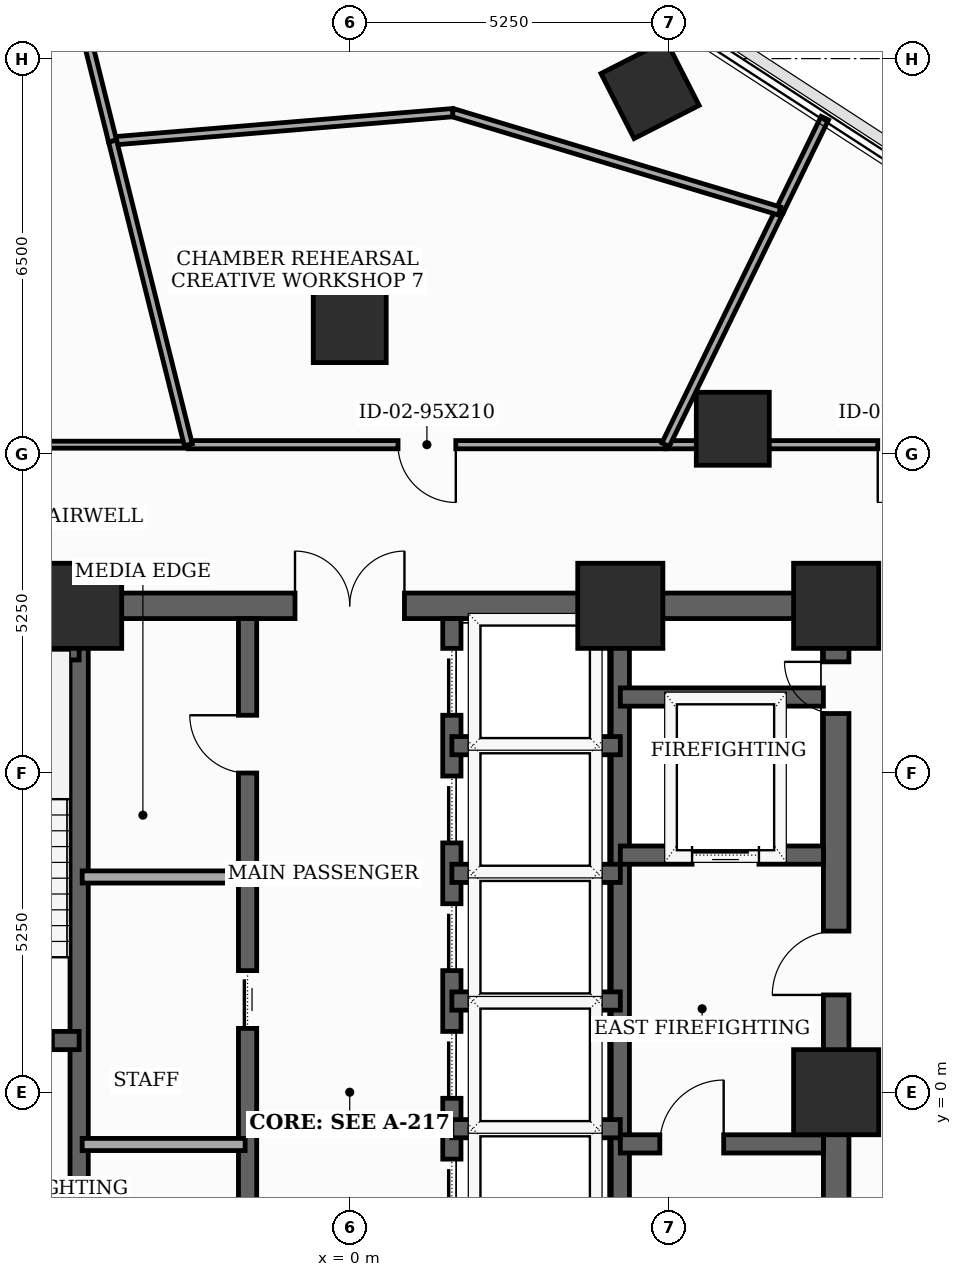
"""IFC4 building model, lengths in metres.
Left out: names, types, materials, properties, quantities, classifications, styles, units other than length and angle.
Written with IfcOpenShell. Run it as: python <this file> out.ifc"""

import sys

from ifc_helpers import new_model, si_unit, direction, frame, frame_2d, origin, origin_2d, place, context, subcontext, project, spatial, rectangle, extrude, element, fill, save


model = new_model("IFC4")
c1 = context("Model", 3, precision=1e-05, world=origin(), true_north=direction((0.0, 1.0)))
c2 = subcontext(c1, "Body", "Model", "MODEL_VIEW")
j1 = project(units=[si_unit("LENGTHUNIT", "METRE"), si_unit("PLANEANGLEUNIT", "RADIAN")], contexts=[c1])
p1 = place(None, origin())
s1 = spatial("IfcSite", under=j1, at=p1, CompositionType="ELEMENT")
p2 = place(p1, origin())
s2 = spatial("IfcBuilding", under=s1, at=p2, CompositionType="ELEMENT")
p3 = place(p2, frame((0.0, 0.0, 131.0)))
s3 = spatial("IfcBuildingStorey", under=s2, at=p3, CompositionType="ELEMENT", Elevation=131.0)
for number, where, z_axis, x_axis in (
    (1, (8.0, 0.0, 0.0), (0.0, 0.0, 1.0), (1.0, 0.0, 0.0)),
    (2, (8.0, 8.0, 0.0), (0.0, 0.0, 1.0), (1.0, 0.0, 0.0)),
    (3, (4.45, 8.0, 0.0), (0.0, 0.0, 1.0), (1.0, 0.0, 0.0)),
    (4, (-4.45, 8.0, 0.0), (0.0, 0.0, 1.0), (1.0, 0.0, 0.0)),
):
    element("IfcColumn", number, at=place(p3, frame(where, z_axis=z_axis, x_axis=x_axis)), inside=s3, PredefinedType="COLUMN", context=c2, shape_type="SweptSolid", body=[
        extrude(rectangle(XDim=1.4, YDim=1.4, at=origin_2d()), origin(), (0.0, 0.0, 1.0), 3.7),
    ])
for number, where, z_axis, x_axis in (
    (5, (6.3, 10.912, 0.0), (0.0, 0.0, 1.0), (1.0, 0.0, 0.0)),
    (6, (0.0, 12.6, 0.0), (0.0, 0.0, 1.0), (1.0, 0.0, 0.0)),
    (7, (4.939, 16.492, 0.0), (0.0, 0.0, 1.0), (0.891, 0.454, 0.0)),
):
    element("IfcColumn", number, at=place(p3, frame(where, z_axis=z_axis, x_axis=x_axis)), inside=s3, PredefinedType="COLUMN", context=c2, shape_type="SweptSolid", body=[
        extrude(rectangle(XDim=1.2, YDim=1.2, at=origin_2d()), origin(), (0.0, 0.0, 1.0), 3.7),
    ])
p4 = place(p3, frame((8.0, -8.0, 0.0), z_axis=(0.0, 0.0, 1.0), x_axis=(0.0, 1.0, 0.0)))
e8 = element("IfcWall", 8, at=p4, inside=s3, PredefinedType="SHEAR", context=c2, shape_type="SweptSolid", body=[
    extrude(rectangle(XDim=16.0, YDim=0.42, at=frame_2d((8.0, 0.0))), origin(), (0.0, 0.0, 1.0), 3.5),
])
p5 = place(p4, frame((9.6, 0.0, 0.0)))
e9 = element("IfcOpeningElement", 9, at=p5, cuts=e8, PredefinedType="OPENING", context=c2, shape_type="SweptSolid", body=[
    extrude(rectangle(XDim=1.05, YDim=2.15, at=frame_2d((0.525, 1.075))), frame((0.0, 0.22, 0.0), z_axis=(0.0, -1.0, 0.0), x_axis=(1.0, 0.0, 0.0)), (0.0, 0.0, 1.0), 0.44),
])
p6 = place(p4, frame((14.229, 0.0, 0.0)))
e10 = element("IfcOpeningElement", 10, at=p6, cuts=e8, PredefinedType="OPENING", context=c2, shape_type="SweptSolid", body=[
    extrude(rectangle(XDim=0.85, YDim=2.02, at=frame_2d((0.425, 1.01))), frame((0.0, 0.22, 0.0), z_axis=(0.0, -1.0, 0.0), x_axis=(1.0, 0.0, 0.0)), (0.0, 0.0, 1.0), 0.44),
])
p7 = place(p3, frame((-8.0, 8.0, 0.0), z_axis=(0.0, 0.0, 1.0), x_axis=(1.0, 0.0, 0.0)))
e11 = element("IfcWall", 11, at=p7, inside=s3, PredefinedType="SHEAR", context=c2, shape_type="SweptSolid", body=[
    extrude(rectangle(XDim=16.0, YDim=0.42, at=frame_2d((8.0, 0.0))), origin(), (0.0, 0.0, 1.0), 3.5),
])
p8 = place(p7, frame((7.1, 0.0, 0.0)))
e12 = element("IfcOpeningElement", 12, at=p8, cuts=e11, PredefinedType="OPENING", context=c2, shape_type="SweptSolid", body=[
    extrude(rectangle(XDim=1.8, YDim=2.15, at=frame_2d((0.9, 1.075))), frame((0.0, 0.22, 0.0), z_axis=(0.0, -1.0, 0.0), x_axis=(1.0, 0.0, 0.0)), (0.0, 0.0, 1.0), 0.44),
])
for number, where, z_axis, x_axis in (
    (13, (-4.45, -7.79, 0.0), (0.0, 0.0, 1.0), (0.0, 1.0, 0.0)),
    (14, (4.45, -7.79, 0.0), (0.0, 0.0, 1.0), (0.0, 1.0, 0.0)),
):
    element("IfcWall", number, at=place(p3, frame(where, z_axis=z_axis, x_axis=x_axis)), inside=s3, PredefinedType="SHEAR", context=c2, shape_type="SweptSolid", body=[
        extrude(rectangle(XDim=15.58, YDim=0.3, at=frame_2d((7.79, 0.0))), origin(), (0.0, 0.0, 1.0), 3.5),
    ])
p9 = place(p3, frame((-7.79, 0.85, 0.0), z_axis=(0.0, 0.0, 1.0), x_axis=(1.0, 0.0, 0.0)))
e15 = element("IfcWall", 15, at=p9, inside=s3, PredefinedType="SHEAR", context=c2, shape_type="SweptSolid", body=[
    extrude(rectangle(XDim=3.34, YDim=0.3, at=frame_2d((1.67, 0.0))), origin(), (0.0, 0.0, 1.0), 3.5),
])
p10 = place(p9, frame((1.85, 0.0, 0.0)))
e16 = element("IfcOpeningElement", 16, at=p10, cuts=e15, PredefinedType="OPENING", context=c2, shape_type="SweptSolid", body=[
    extrude(rectangle(XDim=1.05, YDim=2.15, at=frame_2d((0.525, 1.075))), frame((0.0, 0.16, 0.0), z_axis=(0.0, -1.0, 0.0), x_axis=(1.0, 0.0, 0.0)), (0.0, 0.0, 1.0), 0.32),
])
p11 = place(p3, frame((-7.79, 7.26, 0.0), z_axis=(0.0, 0.0, 1.0), x_axis=(1.0, 0.0, 0.0)))
e17 = element("IfcWall", 17, at=p11, inside=s3, PredefinedType="SHEAR", context=c2, shape_type="SweptSolid", body=[
    extrude(rectangle(XDim=3.34, YDim=0.3, at=frame_2d((1.67, 0.0))), origin(), (0.0, 0.0, 1.0), 3.5),
])
p12 = place(p3, frame((4.45, -0.85, 0.0), z_axis=(0.0, 0.0, 1.0), x_axis=(1.0, 0.0, 0.0)))
e18 = element("IfcWall", 18, at=p12, inside=s3, PredefinedType="SHEAR", context=c2, shape_type="SweptSolid", body=[
    extrude(rectangle(XDim=3.34, YDim=0.3, at=frame_2d((1.67, 0.0))), origin(), (0.0, 0.0, 1.0), 3.5),
])
p13 = place(p12, frame((0.65, 0.0, 0.0)))
e19 = element("IfcOpeningElement", 19, at=p13, cuts=e18, PredefinedType="OPENING", context=c2, shape_type="SweptSolid", body=[
    extrude(rectangle(XDim=1.05, YDim=2.15, at=frame_2d((0.525, 1.075))), frame((0.0, 0.16, 0.0), z_axis=(0.0, -1.0, 0.0), x_axis=(1.0, 0.0, 0.0)), (0.0, 0.0, 1.0), 0.32),
])
p14 = place(p3, frame((4.45, 3.9, 0.0), z_axis=(0.0, 0.0, 1.0), x_axis=(1.0, 0.0, 0.0)))
e20 = element("IfcWall", 20, at=p14, inside=s3, PredefinedType="SHEAR", context=c2, shape_type="SweptSolid", body=[
    extrude(rectangle(XDim=3.34, YDim=0.3, at=frame_2d((1.67, 0.0))), origin(), (0.0, 0.0, 1.0), 3.5),
])
p15 = place(p14, frame((1.18, 0.0, 0.0)))
e21 = element("IfcOpeningElement", 21, at=p15, cuts=e20, PredefinedType="OPENING", context=c2, shape_type="SweptSolid", body=[
    extrude(rectangle(XDim=1.1, YDim=2.1, at=frame_2d((0.55, 1.05))), frame((0.0, 0.16, 0.0), z_axis=(0.0, -1.0, 0.0), x_axis=(1.0, 0.0, 0.0)), (0.0, 0.0, 1.0), 0.32),
])
p16 = place(p3, frame((4.45, 6.5, 0.0), z_axis=(0.0, 0.0, 1.0), x_axis=(1.0, 0.0, 0.0)))
e22 = element("IfcWall", 22, at=p16, inside=s3, PredefinedType="SHEAR", context=c2, shape_type="SweptSolid", body=[
    extrude(rectangle(XDim=3.34, YDim=0.3, at=frame_2d((1.67, 0.0))), origin(), (0.0, 0.0, 1.0), 3.5),
])
p17 = place(p3, frame((-1.68, -4.85, 0.0), z_axis=(0.0, 0.0, 1.0), x_axis=(0.0, 1.0, 0.0)))
e23 = element("IfcWall", 23, at=p17, inside=s3, PredefinedType="SHEAR", context=c2, shape_type="SweptSolid", body=[
    extrude(rectangle(XDim=12.64, YDim=0.3, at=frame_2d((6.32, 0.0))), origin(), (0.0, 0.0, 1.0), 3.5),
])
p18 = place(p17, frame((1.65, 0.0, 0.0)))
e24 = element("IfcOpeningElement", 24, at=p18, cuts=e23, PredefinedType="OPENING", context=c2, shape_type="SweptSolid", body=[
    extrude(rectangle(XDim=0.95, YDim=2.1, at=frame_2d((0.475, 1.05))), frame((0.0, 0.16, 0.0), z_axis=(0.0, -1.0, 0.0), x_axis=(1.0, 0.0, 0.0)), (0.0, 0.0, 1.0), 0.32),
])
p19 = place(p17, frame((5.9, 0.0, 0.0)))
e25 = element("IfcOpeningElement", 25, at=p19, cuts=e23, PredefinedType="OPENING", context=c2, shape_type="SweptSolid", body=[
    extrude(rectangle(XDim=0.95, YDim=2.1, at=frame_2d((0.475, 1.05))), frame((0.0, 0.16, 0.0), z_axis=(0.0, -1.0, 0.0), x_axis=(1.0, 0.0, 0.0)), (0.0, 0.0, 1.0), 0.32),
])
p20 = place(p17, frame((10.1, 0.0, 0.0)))
e26 = element("IfcOpeningElement", 26, at=p20, cuts=e23, PredefinedType="OPENING", context=c2, shape_type="SweptSolid", body=[
    extrude(rectangle(XDim=0.95, YDim=2.1, at=frame_2d((0.475, 1.05))), frame((0.0, 0.16, 0.0), z_axis=(0.0, -1.0, 0.0), x_axis=(1.0, 0.0, 0.0)), (0.0, 0.0, 1.0), 0.32),
])
p21 = place(p3, frame((1.68, -4.85, 0.0), z_axis=(0.0, 0.0, 1.0), x_axis=(0.0, 1.0, 0.0)))
e27 = element("IfcWall", 27, at=p21, inside=s3, PredefinedType="SHEAR", context=c2, shape_type="SweptSolid", body=[
    extrude(rectangle(XDim=12.64, YDim=0.3, at=frame_2d((6.32, 0.0))), origin(), (0.0, 0.0, 1.0), 3.5),
])
p22 = place(p21, frame((0.55, 0.0, 0.0)))
e28 = element("IfcOpeningElement", 28, at=p22, cuts=e27, PredefinedType="OPENING", context=c2, shape_type="SweptSolid", body=[
    extrude(rectangle(XDim=1.1, YDim=2.1, at=frame_2d((0.55, 1.05))), frame((0.0, 0.16, 0.0), z_axis=(0.0, -1.0, 0.0), x_axis=(1.0, 0.0, 0.0)), (0.0, 0.0, 1.0), 0.32),
])
p23 = place(p21, frame((2.65, 0.0, 0.0)))
e29 = element("IfcOpeningElement", 29, at=p23, cuts=e27, PredefinedType="OPENING", context=c2, shape_type="SweptSolid", body=[
    extrude(rectangle(XDim=1.1, YDim=2.1, at=frame_2d((0.55, 1.05))), frame((0.0, 0.16, 0.0), z_axis=(0.0, -1.0, 0.0), x_axis=(1.0, 0.0, 0.0)), (0.0, 0.0, 1.0), 0.32),
])
p24 = place(p21, frame((4.75, 0.0, 0.0)))
e30 = element("IfcOpeningElement", 30, at=p24, cuts=e27, PredefinedType="OPENING", context=c2, shape_type="SweptSolid", body=[
    extrude(rectangle(XDim=1.1, YDim=2.1, at=frame_2d((0.55, 1.05))), frame((0.0, 0.16, 0.0), z_axis=(0.0, -1.0, 0.0), x_axis=(1.0, 0.0, 0.0)), (0.0, 0.0, 1.0), 0.32),
])
p25 = place(p21, frame((6.85, 0.0, 0.0)))
e31 = element("IfcOpeningElement", 31, at=p25, cuts=e27, PredefinedType="OPENING", context=c2, shape_type="SweptSolid", body=[
    extrude(rectangle(XDim=1.1, YDim=2.1, at=frame_2d((0.55, 1.05))), frame((0.0, 0.16, 0.0), z_axis=(0.0, -1.0, 0.0), x_axis=(1.0, 0.0, 0.0)), (0.0, 0.0, 1.0), 0.32),
])
p26 = place(p21, frame((8.95, 0.0, 0.0)))
e32 = element("IfcOpeningElement", 32, at=p26, cuts=e27, PredefinedType="OPENING", context=c2, shape_type="SweptSolid", body=[
    extrude(rectangle(XDim=1.1, YDim=2.1, at=frame_2d((0.55, 1.05))), frame((0.0, 0.16, 0.0), z_axis=(0.0, -1.0, 0.0), x_axis=(1.0, 0.0, 0.0)), (0.0, 0.0, 1.0), 0.32),
])
p27 = place(p21, frame((11.05, 0.0, 0.0)))
e33 = element("IfcOpeningElement", 33, at=p27, cuts=e27, PredefinedType="OPENING", context=c2, shape_type="SweptSolid", body=[
    extrude(rectangle(XDim=1.1, YDim=2.1, at=frame_2d((0.55, 1.05))), frame((0.0, 0.16, 0.0), z_axis=(0.0, -1.0, 0.0), x_axis=(1.0, 0.0, 0.0)), (0.0, 0.0, 1.0), 0.32),
])
for number, where, z_axis, x_axis in (
    (34, (1.68, 1.5, 0.0), (0.0, 0.0, 1.0), (1.0, 0.0, 0.0)),
    (35, (1.68, 3.6, 0.0), (0.0, 0.0, 1.0), (1.0, 0.0, 0.0)),
    (36, (1.68, 5.7, 0.0), (0.0, 0.0, 1.0), (1.0, 0.0, 0.0)),
    (37, (1.68, -0.6, 0.0), (0.0, 0.0, 1.0), (1.0, 0.0, 0.0)),
):
    element("IfcWall", number, at=place(p3, frame(where, z_axis=z_axis, x_axis=x_axis)), inside=s3, PredefinedType="SHEAR", context=c2, shape_type="SweptSolid", body=[
        extrude(rectangle(XDim=2.77, YDim=0.3, at=frame_2d((1.385, 0.0))), origin(), (0.0, 0.0, 1.0), 3.5),
    ])
for number, where, z_axis, x_axis in (
    (38, (-4.4, -0.86, 0.0), (0.0, 0.0, 1.0), (1.0, 0.0, 0.0)),
    (39, (-4.4, 3.54, 0.0), (0.0, 0.0, 1.0), (1.0, 0.0, 0.0)),
):
    element("IfcWall", number, at=place(p3, frame(where, z_axis=z_axis, x_axis=x_axis)), inside=s3, PredefinedType="SOLIDWALL", context=c2, shape_type="SweptSolid", body=[
        extrude(rectangle(XDim=2.68, YDim=0.2, at=frame_2d((1.34, 0.0))), origin(), (0.0, 0.0, 1.0), 3.5),
    ])
p28 = place(p3, frame((10.15, 10.65, 0.0), z_axis=(0.0, 0.0, 1.0), x_axis=(-1.0, 0.0, 0.0)))
e40 = element("IfcWall", 40, at=p28, inside=s3, PredefinedType="PARTITIONING", context=c2, shape_type="SweptSolid", body=[
    extrude(rectangle(XDim=4.956, YDim=0.135, at=frame_2d((2.478, 0.0))), origin(), (0.0, 0.0, 1.0), 2.785),
])
p29 = place(p28, frame((0.516, 0.0, 0.0)))
e41 = element("IfcOpeningElement", 41, at=p29, cuts=e40, PredefinedType="OPENING", context=c2, shape_type="SweptSolid", body=[
    extrude(rectangle(XDim=0.95, YDim=2.1, at=frame_2d((0.475, 1.05))), frame((0.0, 0.077, 0.0), z_axis=(0.0, -1.0, 0.0), x_axis=(1.0, 0.0, 0.0)), (0.0, 0.0, 1.0), 0.155),
])
p30 = place(p3, frame((5.194, 10.65, 0.0), z_axis=(0.0, 0.0, 1.0), x_axis=(-1.0, 0.0, 0.0)))
e42 = element("IfcWall", 42, at=p30, inside=s3, PredefinedType="PARTITIONING", context=c2, shape_type="SweptSolid", body=[
    extrude(rectangle(XDim=7.849, YDim=0.135, at=frame_2d((3.925, 0.0))), origin(), (0.0, 0.0, 1.0), 2.785),
])
p31 = place(p30, frame((3.449, 0.0, 0.0)))
e43 = element("IfcOpeningElement", 43, at=p31, cuts=e42, PredefinedType="OPENING", context=c2, shape_type="SweptSolid", body=[
    extrude(rectangle(XDim=0.95, YDim=2.1, at=frame_2d((0.475, 1.05))), frame((0.0, 0.077, 0.0), z_axis=(0.0, -1.0, 0.0), x_axis=(1.0, 0.0, 0.0)), (0.0, 0.0, 1.0), 0.155),
])
p32 = place(p3, frame((-2.655, 10.65, 0.0), z_axis=(0.0, 0.0, 1.0), x_axis=(-1.0, 0.0, 0.0)))
e44 = element("IfcWall", 44, at=p32, inside=s3, PredefinedType="PARTITIONING", context=c2, shape_type="SweptSolid", body=[
    extrude(rectangle(XDim=7.495, YDim=0.115, at=frame_2d((3.748, 0.0))), origin(), (0.0, 0.0, 1.0), 2.785),
])
p33 = place(p3, frame((7.069, 14.493, 0.0), z_axis=(0.0, 0.0, 1.0), x_axis=(-0.438491124388, -0.898735519401, 0.0)))
e45 = element("IfcWall", 45, at=p33, inside=s3, PredefinedType="PARTITIONING", context=c2, shape_type="SweptSolid", body=[
    extrude(rectangle(XDim=4.276, YDim=0.135, at=frame_2d((2.138, 0.0))), origin(), (0.0, 0.0, 1.0), 2.785),
])
p34 = place(p3, frame((7.813, 16.021, 0.0), z_axis=(0.0, 0.0, 1.0), x_axis=(-0.437939658317, -0.899004369107, 0.0)))
e46 = element("IfcWall", 46, at=p34, inside=s3, PredefinedType="PARTITIONING", context=c2, shape_type="SweptSolid", body=[
    extrude(rectangle(XDim=1.7, YDim=0.135, at=frame_2d((0.85, 0.0))), origin(), (0.0, 0.0, 1.0), 2.985),
])
p35 = place(p3, frame((7.069, 14.493, 0.0), z_axis=(0.0, 0.0, 1.0), x_axis=(-0.957562573124, 0.288225464789, 0.0)))
e47 = element("IfcWall", 47, at=p35, inside=s3, PredefinedType="PARTITIONING", context=c2, shape_type="SweptSolid", body=[
    extrude(rectangle(XDim=5.614, YDim=0.135, at=frame_2d((2.807, 0.0))), origin(), (0.0, 0.0, 1.0), 2.885),
])
p36 = place(p3, frame((1.693, 16.111, 0.0), z_axis=(0.0, 0.0, 1.0), x_axis=(-0.996561637531, -0.082854707786, 0.0)))
e48 = element("IfcWall", 48, at=p36, inside=s3, PredefinedType="PARTITIONING", context=c2, shape_type="SweptSolid", body=[
    extrude(rectangle(XDim=5.613, YDim=0.135, at=frame_2d((2.807, 0.0))), origin(), (0.0, 0.0, 1.0), 2.885),
])
p37 = place(p3, frame((-3.901, 15.646, 0.0), z_axis=(0.0, 0.0, 1.0), x_axis=(0.241955453095, -0.970287358836, 0.0)))
e49 = element("IfcWall", 49, at=p37, inside=s3, PredefinedType="PARTITIONING", context=c2, shape_type="SweptSolid", body=[
    extrude(rectangle(XDim=5.149, YDim=0.135, at=frame_2d((2.575, 0.0))), origin(), (0.0, 0.0, 1.0), 2.785),
])
p38 = place(p3, frame((-6.276, 25.171, 0.0), z_axis=(0.0, 0.0, 1.0), x_axis=(0.241962105276, -0.970285699993, 0.0)))
e50 = element("IfcWall", 50, at=p38, inside=s3, PredefinedType="PARTITIONING", context=c2, shape_type="SweptSolid", body=[
    extrude(rectangle(XDim=9.817, YDim=0.135, at=frame_2d((4.908, 0.0))), origin(), (0.0, 0.0, 1.0), 2.985),
])
p39 = place(p38, frame((4.448, 0.0, 0.0)))
e51 = element("IfcOpeningElement", 51, at=p39, cuts=e50, PredefinedType="OPENING", context=c2, shape_type="SweptSolid", body=[
    extrude(rectangle(XDim=0.92, YDim=2.1, at=frame_2d((0.46, 1.05))), frame((0.0, 0.077, 0.0), z_axis=(0.0, -1.0, 0.0), x_axis=(1.0, 0.0, 0.0)), (0.0, 0.0, 1.0), 0.155),
])
p40 = place(p5, origin())
e52 = element("IfcDoor", 52, at=p40, inside=s3, OperationType="SINGLE_SWING_LEFT", PredefinedType="DOOR", context=c2, shape_type="SweptSolid", body=[
    extrude(rectangle(XDim=1.05, YDim=2.15, at=frame_2d((0.525, 1.075))), frame((0.0, 0.025, 0.0), z_axis=(0.0, -1.0, 0.0), x_axis=(1.0, 0.0, 0.0)), (0.0, 0.0, 1.0), 0.05),
])
fill(e9, e52)
p41 = place(p6, origin())
e53 = element("IfcDoor", 53, at=p41, inside=s3, OperationType="SINGLE_SWING_RIGHT", PredefinedType="TRAPDOOR", context=c2, shape_type="SweptSolid", body=[
    extrude(rectangle(XDim=0.85, YDim=2.02, at=frame_2d((0.425, 1.01))), frame((0.0, 0.025, 0.0), z_axis=(0.0, -1.0, 0.0), x_axis=(1.0, 0.0, 0.0)), (0.0, 0.0, 1.0), 0.05),
])
fill(e10, e53)
p42 = place(p8, origin())
e54 = element("IfcDoor", 54, at=p42, inside=s3, OperationType="DOUBLE_DOOR_SINGLE_SWING", PredefinedType="DOOR", context=c2, shape_type="SweptSolid", body=[
    extrude(rectangle(XDim=1.8, YDim=2.15, at=frame_2d((0.9, 1.075))), frame((0.0, 0.025, 0.0), z_axis=(0.0, -1.0, 0.0), x_axis=(1.0, 0.0, 0.0)), (0.0, 0.0, 1.0), 0.05),
])
fill(e12, e54)
p43 = place(p10, origin())
e55 = element("IfcDoor", 55, at=p43, inside=s3, OperationType="SINGLE_SWING_LEFT", PredefinedType="DOOR", context=c2, shape_type="SweptSolid", body=[
    extrude(rectangle(XDim=1.05, YDim=2.15, at=frame_2d((0.525, 1.075))), frame((0.0, 0.025, 0.0), z_axis=(0.0, -1.0, 0.0), x_axis=(1.0, 0.0, 0.0)), (0.0, 0.0, 1.0), 0.05),
])
fill(e16, e55)
p44 = place(p13, origin())
e56 = element("IfcDoor", 56, at=p44, inside=s3, OperationType="SINGLE_SWING_RIGHT", PredefinedType="DOOR", context=c2, shape_type="SweptSolid", body=[
    extrude(rectangle(XDim=1.05, YDim=2.15, at=frame_2d((0.525, 1.075))), frame((0.0, 0.025, 0.0), z_axis=(0.0, -1.0, 0.0), x_axis=(1.0, 0.0, 0.0)), (0.0, 0.0, 1.0), 0.05),
])
fill(e19, e56)
p45 = place(p15, origin())
e57 = element("IfcDoor", 57, at=p45, inside=s3, OperationType="SLIDING_TO_LEFT", PredefinedType="DOOR", context=c2, shape_type="SweptSolid", body=[
    extrude(rectangle(XDim=1.1, YDim=2.1, at=frame_2d((0.55, 1.05))), frame((0.0, 0.025, 0.0), z_axis=(0.0, -1.0, 0.0), x_axis=(1.0, 0.0, 0.0)), (0.0, 0.0, 1.0), 0.05),
])
fill(e21, e57)
p46 = place(p19, origin())
e58 = element("IfcDoor", 58, at=p46, inside=s3, OperationType="SLIDING_TO_LEFT", PredefinedType="DOOR", context=c2, shape_type="SweptSolid", body=[
    extrude(rectangle(XDim=0.95, YDim=2.1, at=frame_2d((0.475, 1.05))), frame((0.0, 0.025, 0.0), z_axis=(0.0, -1.0, 0.0), x_axis=(1.0, 0.0, 0.0)), (0.0, 0.0, 1.0), 0.05),
])
fill(e25, e58)
p47 = place(p20, origin())
e59 = element("IfcDoor", 59, at=p47, inside=s3, OperationType="SINGLE_SWING_RIGHT", PredefinedType="DOOR", context=c2, shape_type="SweptSolid", body=[
    extrude(rectangle(XDim=0.95, YDim=2.1, at=frame_2d((0.475, 1.05))), frame((0.0, 0.025, 0.0), z_axis=(0.0, -1.0, 0.0), x_axis=(1.0, 0.0, 0.0)), (0.0, 0.0, 1.0), 0.05),
])
fill(e26, e59)
p48 = place(p23, origin())
e60 = element("IfcDoor", 60, at=p48, inside=s3, OperationType="SLIDING_TO_LEFT", PredefinedType="DOOR", context=c2, shape_type="SweptSolid", body=[
    extrude(rectangle(XDim=1.1, YDim=2.1, at=frame_2d((0.55, 1.05))), frame((0.0, 0.025, 0.0), z_axis=(0.0, -1.0, 0.0), x_axis=(1.0, 0.0, 0.0)), (0.0, 0.0, 1.0), 0.05),
])
fill(e29, e60)
p49 = place(p24, origin())
e61 = element("IfcDoor", 61, at=p49, inside=s3, OperationType="SLIDING_TO_LEFT", PredefinedType="DOOR", context=c2, shape_type="SweptSolid", body=[
    extrude(rectangle(XDim=1.1, YDim=2.1, at=frame_2d((0.55, 1.05))), frame((0.0, 0.025, 0.0), z_axis=(0.0, -1.0, 0.0), x_axis=(1.0, 0.0, 0.0)), (0.0, 0.0, 1.0), 0.05),
])
fill(e30, e61)
p50 = place(p25, origin())
e62 = element("IfcDoor", 62, at=p50, inside=s3, OperationType="SLIDING_TO_LEFT", PredefinedType="DOOR", context=c2, shape_type="SweptSolid", body=[
    extrude(rectangle(XDim=1.1, YDim=2.1, at=frame_2d((0.55, 1.05))), frame((0.0, 0.025, 0.0), z_axis=(0.0, -1.0, 0.0), x_axis=(1.0, 0.0, 0.0)), (0.0, 0.0, 1.0), 0.05),
])
fill(e31, e62)
p51 = place(p26, origin())
e63 = element("IfcDoor", 63, at=p51, inside=s3, OperationType="SLIDING_TO_LEFT", PredefinedType="DOOR", context=c2, shape_type="SweptSolid", body=[
    extrude(rectangle(XDim=1.1, YDim=2.1, at=frame_2d((0.55, 1.05))), frame((0.0, 0.025, 0.0), z_axis=(0.0, -1.0, 0.0), x_axis=(1.0, 0.0, 0.0)), (0.0, 0.0, 1.0), 0.05),
])
fill(e32, e63)
p52 = place(p27, origin())
e64 = element("IfcDoor", 64, at=p52, inside=s3, OperationType="SLIDING_TO_LEFT", PredefinedType="DOOR", context=c2, shape_type="SweptSolid", body=[
    extrude(rectangle(XDim=1.1, YDim=2.1, at=frame_2d((0.55, 1.05))), frame((0.0, 0.025, 0.0), z_axis=(0.0, -1.0, 0.0), x_axis=(1.0, 0.0, 0.0)), (0.0, 0.0, 1.0), 0.05),
])
fill(e33, e64)
p53 = place(p29, origin())
e65 = element("IfcDoor", 65, at=p53, inside=s3, OperationType="SINGLE_SWING_RIGHT", PredefinedType="DOOR", context=c2, shape_type="SweptSolid", body=[
    extrude(rectangle(XDim=0.95, YDim=2.1, at=frame_2d((0.475, 1.05))), frame((0.0, 0.025, 0.0), z_axis=(0.0, -1.0, 0.0), x_axis=(1.0, 0.0, 0.0)), (0.0, 0.0, 1.0), 0.05),
])
fill(e41, e65)
p54 = place(p31, origin())
e66 = element("IfcDoor", 66, at=p54, inside=s3, OperationType="SINGLE_SWING_LEFT", PredefinedType="DOOR", context=c2, shape_type="SweptSolid", body=[
    extrude(rectangle(XDim=0.95, YDim=2.1, at=frame_2d((0.475, 1.05))), frame((0.0, 0.025, 0.0), z_axis=(0.0, -1.0, 0.0), x_axis=(1.0, 0.0, 0.0)), (0.0, 0.0, 1.0), 0.05),
])
fill(e43, e66)
save(model, sys.argv[1])
